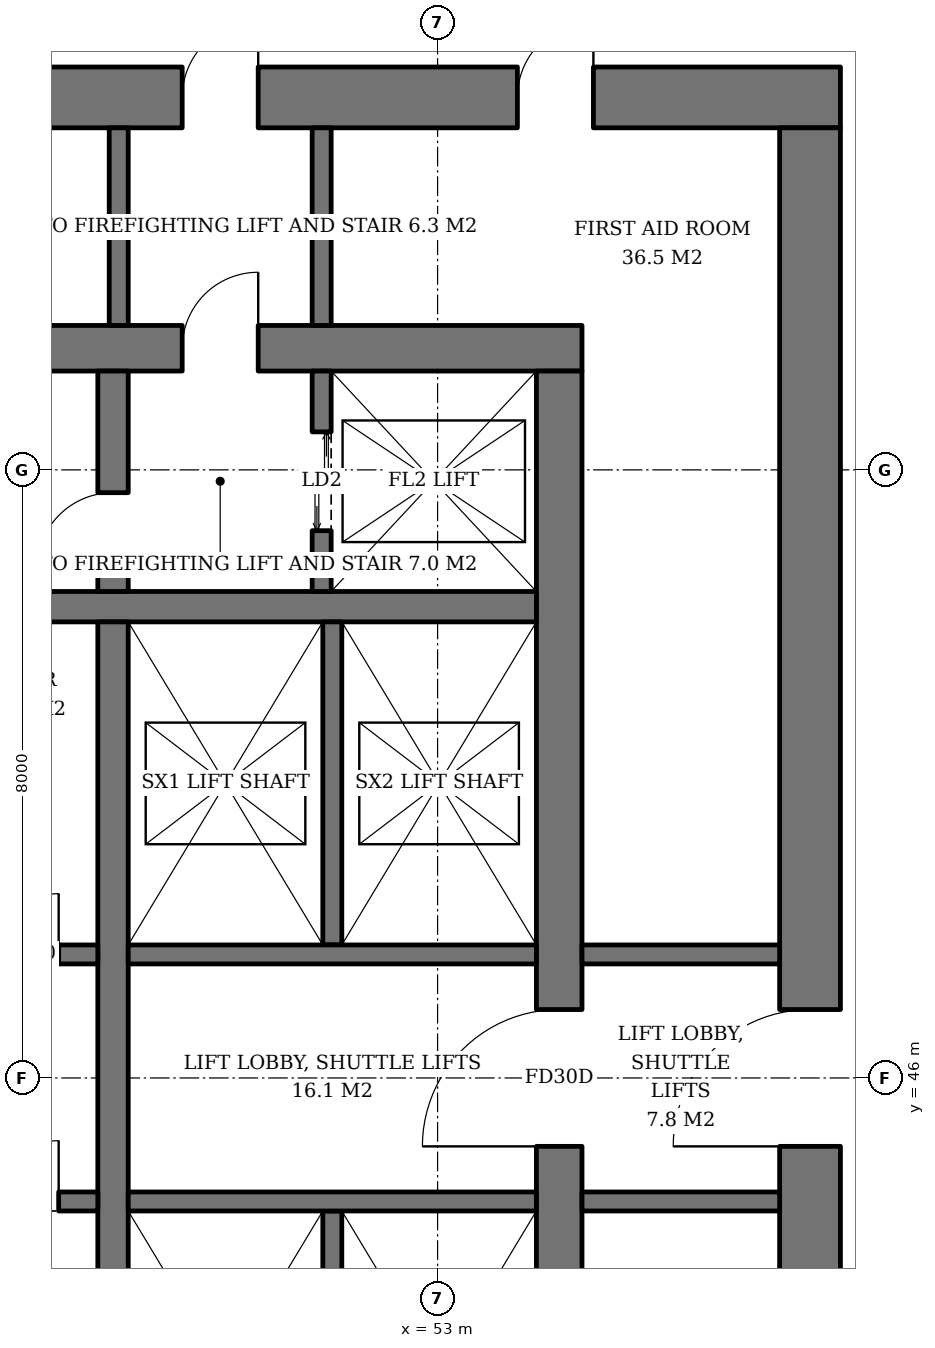
"""IFC4 building model, lengths in metres.
Left out: names, types, materials, properties, quantities, classifications, styles, units other than length and angle.
Written with IfcOpenShell. Run it as: python <this file> out.ifc"""

import sys

from ifc_helpers import new_model, si_unit, direction, frame, frame_2d, origin, place, context, subcontext, project, spatial, rectangle, extrude, element, fill, save


model = new_model("IFC4")
c1 = context("Model", 3, precision=1e-05, world=origin(), true_north=direction((0.0, 1.0)))
c2 = subcontext(c1, "Body", "Model", "MODEL_VIEW")
j1 = project(units=[si_unit("LENGTHUNIT", "METRE"), si_unit("PLANEANGLEUNIT", "RADIAN")], contexts=[c1])
p1 = place(None, origin())
s1 = spatial("IfcSite", under=j1, at=p1, CompositionType="ELEMENT")
p2 = place(p1, origin())
s2 = spatial("IfcBuilding", under=s1, at=p2, CompositionType="ELEMENT")
p3 = place(p2, frame((0.0, 0.0, 55.2)))
s3 = spatial("IfcBuildingStorey", under=s2, at=p3, CompositionType="ELEMENT", Elevation=55.2)
p4 = place(p3, frame((35.1, 55.6, 0.0), z_axis=(0.0, 0.0, 1.0), x_axis=(1.0, 0.0, 0.0)))
e1 = element("IfcWall", 1, at=p4, inside=s3, PredefinedType="SHEAR", context=c2, shape_type="SweptSolid", body=[
    extrude(rectangle(XDim=19.8, YDim=0.6, at=frame_2d((9.9, 0.0))), origin(), (0.0, 0.0, 1.0), 3.8),
])
p5 = place(p4, frame((14.54, 0.0, 0.0)))
e2 = element("IfcOpeningElement", 2, at=p5, cuts=e1, PredefinedType="OPENING", context=c2, shape_type="SweptSolid", body=[
    extrude(rectangle(XDim=1.0, YDim=2.1, at=frame_2d((0.5, 1.05))), frame((0.0, 0.31, 0.0), z_axis=(0.0, -1.0, 0.0), x_axis=(1.0, 0.0, 0.0)), (0.0, 0.0, 1.0), 0.62),
])
p6 = place(p4, frame((2.425, 0.0, 0.0)))
e3 = element("IfcOpeningElement", 3, at=p6, cuts=e1, PredefinedType="OPENING", context=c2, shape_type="SweptSolid", body=[
    extrude(rectangle(XDim=1.0, YDim=2.1, at=frame_2d((0.5, 1.05))), frame((0.0, 0.31, 0.0), z_axis=(0.0, -1.0, 0.0), x_axis=(1.0, 0.0, 0.0)), (0.0, 0.0, 1.0), 0.62),
])
p7 = place(p3, frame((54.6, 36.7, 0.0), z_axis=(0.0, 0.0, 1.0), x_axis=(0.0, 1.0, 0.0)))
e4 = element("IfcWall", 4, at=p7, inside=s3, PredefinedType="SHEAR", context=c2, shape_type="SweptSolid", body=[
    extrude(rectangle(XDim=18.6, YDim=0.6, at=frame_2d((9.3, 0.0))), origin(), (0.0, 0.0, 1.0), 3.8),
])
p8 = place(p7, frame((8.4, 0.0, 0.0)))
e5 = element("IfcOpeningElement", 5, at=p8, cuts=e4, PredefinedType="OPENING", context=c2, shape_type="SweptSolid", body=[
    extrude(rectangle(XDim=1.8, YDim=2.4, at=frame_2d((0.9, 1.2))), frame((0.0, 0.31, 0.0), z_axis=(0.0, -1.0, 0.0), x_axis=(1.0, 0.0, 0.0)), (0.0, 0.0, 1.0), 0.62),
])
p9 = place(p3, frame((31.7, 58.9, 0.0), z_axis=(0.0, 0.0, 1.0), x_axis=(1.0, 0.0, 0.0)))
e6 = element("IfcWall", 6, at=p9, inside=s3, PredefinedType="SHEAR", context=c2, shape_type="SweptSolid", body=[
    extrude(rectangle(XDim=26.6, YDim=0.8, at=frame_2d((13.3, 0.0))), origin(), (0.0, 0.0, 1.0), 3.8),
])
p10 = place(p9, frame((17.94, 0.0, 0.0)))
e7 = element("IfcOpeningElement", 7, at=p10, cuts=e6, PredefinedType="OPENING", context=c2, shape_type="SweptSolid", body=[
    extrude(rectangle(XDim=1.0, YDim=2.1, at=frame_2d((0.5, 1.05))), frame((0.0, 0.41, 0.0), z_axis=(0.0, -1.0, 0.0), x_axis=(1.0, 0.0, 0.0)), (0.0, 0.0, 1.0), 0.82),
])
p11 = place(p9, frame((5.825, 0.0, 0.0)))
e8 = element("IfcOpeningElement", 8, at=p11, cuts=e6, PredefinedType="OPENING", context=c2, shape_type="SweptSolid", body=[
    extrude(rectangle(XDim=1.0, YDim=2.1, at=frame_2d((0.5, 1.05))), frame((0.0, 0.41, 0.0), z_axis=(0.0, -1.0, 0.0), x_axis=(1.0, 0.0, 0.0)), (0.0, 0.0, 1.0), 0.82),
])
p12 = place(p9, frame((1.05, 0.0, 0.0)))
e9 = element("IfcOpeningElement", 9, at=p12, cuts=e6, PredefinedType="OPENING", context=c2, shape_type="SweptSolid", body=[
    extrude(rectangle(XDim=1.0, YDim=2.1, at=frame_2d((0.5, 1.05))), frame((0.0, 0.41, 0.0), z_axis=(0.0, -1.0, 0.0), x_axis=(1.0, 0.0, 0.0)), (0.0, 0.0, 1.0), 0.82),
])
p13 = place(p9, frame((2.546, 0.0, 0.0)))
e10 = element("IfcOpeningElement", 10, at=p13, cuts=e6, PredefinedType="OPENING", context=c2, shape_type="SweptSolid", body=[
    extrude(rectangle(XDim=1.0, YDim=2.1, at=frame_2d((0.5, 1.05))), frame((0.0, 0.41, 0.0), z_axis=(0.0, -1.0, 0.0), x_axis=(1.0, 0.0, 0.0)), (0.0, 0.0, 1.0), 0.82),
])
p14 = place(p9, frame((4.134, 0.0, 0.0)))
e11 = element("IfcOpeningElement", 11, at=p14, cuts=e6, PredefinedType="OPENING", context=c2, shape_type="SweptSolid", body=[
    extrude(rectangle(XDim=1.0, YDim=2.1, at=frame_2d((0.5, 1.05))), frame((0.0, 0.41, 0.0), z_axis=(0.0, -1.0, 0.0), x_axis=(1.0, 0.0, 0.0)), (0.0, 0.0, 1.0), 0.82),
])
p15 = place(p9, frame((9.126, 0.0, 0.0)))
e12 = element("IfcOpeningElement", 12, at=p15, cuts=e6, PredefinedType="OPENING", context=c2, shape_type="SweptSolid", body=[
    extrude(rectangle(XDim=1.0, YDim=2.1, at=frame_2d((0.5, 1.05))), frame((0.0, 0.41, 0.0), z_axis=(0.0, -1.0, 0.0), x_axis=(1.0, 0.0, 0.0)), (0.0, 0.0, 1.0), 0.82),
])
p16 = place(p9, frame((14.029, 0.0, 0.0)))
e13 = element("IfcOpeningElement", 13, at=p16, cuts=e6, PredefinedType="OPENING", context=c2, shape_type="SweptSolid", body=[
    extrude(rectangle(XDim=1.0, YDim=2.1, at=frame_2d((0.5, 1.05))), frame((0.0, 0.41, 0.0), z_axis=(0.0, -1.0, 0.0), x_axis=(1.0, 0.0, 0.0)), (0.0, 0.0, 1.0), 0.82),
])
p17 = place(p9, frame((22.35, 0.0, 0.0)))
e14 = element("IfcOpeningElement", 14, at=p17, cuts=e6, PredefinedType="OPENING", context=c2, shape_type="SweptSolid", body=[
    extrude(rectangle(XDim=1.0, YDim=2.1, at=frame_2d((0.5, 1.05))), frame((0.0, 0.41, 0.0), z_axis=(0.0, -1.0, 0.0), x_axis=(1.0, 0.0, 0.0)), (0.0, 0.0, 1.0), 0.82),
])
p18 = place(p3, frame((57.9, 33.5, 0.0), z_axis=(0.0, 0.0, 1.0), x_axis=(0.0, 1.0, 0.0)))
e15 = element("IfcWall", 15, at=p18, inside=s3, PredefinedType="SHEAR", context=c2, shape_type="SweptSolid", body=[
    extrude(rectangle(XDim=25.0, YDim=0.8, at=frame_2d((12.5, 0.0))), origin(), (0.0, 0.0, 1.0), 3.8),
])
p19 = place(p18, frame((11.6, 0.0, 0.0)))
e16 = element("IfcOpeningElement", 16, at=p19, cuts=e15, PredefinedType="OPENING", context=c2, shape_type="SweptSolid", body=[
    extrude(rectangle(XDim=1.8, YDim=2.4, at=frame_2d((0.9, 1.2))), frame((0.0, 0.41, 0.0), z_axis=(0.0, -1.0, 0.0), x_axis=(1.0, 0.0, 0.0)), (0.0, 0.0, 1.0), 0.82),
])
p20 = place(p3, frame((35.7, 52.2, 0.0), z_axis=(0.0, 0.0, 1.0), x_axis=(1.0, 0.0, 0.0)))
e17 = element("IfcWall", 17, at=p20, inside=s3, PredefinedType="SHEAR", context=c2, shape_type="SweptSolid", body=[
    extrude(rectangle(XDim=18.6, YDim=0.4, at=frame_2d((9.3, 0.0))), origin(), (0.0, 0.0, 1.0), 3.8),
])
p21 = place(p3, frame((48.73, 40.0, 0.0), z_axis=(0.0, 0.0, 1.0), x_axis=(0.0, 1.0, 0.0)))
e18 = element("IfcWall", 18, at=p21, inside=s3, PredefinedType="SHEAR", context=c2, shape_type="SweptSolid", body=[
    extrude(rectangle(XDim=12.0, YDim=0.4, at=frame_2d((6.0, 0.0))), origin(), (0.0, 0.0, 1.0), 3.8),
])
p22 = place(p3, frame((48.73, 52.4, 0.0), z_axis=(0.0, 0.0, 1.0), x_axis=(0.0, 1.0, 0.0)))
e19 = element("IfcWall", 19, at=p22, inside=s3, PredefinedType="SHEAR", context=c2, shape_type="SweptSolid", body=[
    extrude(rectangle(XDim=2.9, YDim=0.4, at=frame_2d((1.45, 0.0))), origin(), (0.0, 0.0, 1.0), 3.8),
])
p23 = place(p22, frame((0.3, 0.0, 0.0)))
e20 = element("IfcOpeningElement", 20, at=p23, cuts=e19, PredefinedType="OPENING", context=c2, shape_type="SweptSolid", body=[
    extrude(rectangle(XDim=1.0, YDim=2.1, at=frame_2d((0.5, 1.05))), frame((0.0, 0.21, 0.0), z_axis=(0.0, -1.0, 0.0), x_axis=(1.0, 0.0, 0.0)), (0.0, 0.0, 1.0), 0.42),
])
p24 = place(p3, frame((51.475, 52.4, 0.0), z_axis=(0.0, 0.0, 1.0), x_axis=(0.0, 1.0, 0.0)))
e21 = element("IfcWall", 21, at=p24, inside=s3, PredefinedType="SHEAR", context=c2, shape_type="SweptSolid", body=[
    extrude(rectangle(XDim=2.9, YDim=0.25, at=frame_2d((1.45, 0.0))), origin(), (0.0, 0.0, 1.0), 3.8),
])
p25 = place(p24, frame((0.8, 0.0, 0.0)))
e22 = element("IfcOpeningElement", 22, at=p25, cuts=e21, PredefinedType="OPENING", context=c2, shape_type="SweptSolid", body=[
    extrude(rectangle(XDim=1.3, YDim=2.2, at=frame_2d((0.65, 1.1))), frame((0.0, 0.135, 0.0), z_axis=(0.0, -1.0, 0.0), x_axis=(1.0, 0.0, 0.0)), (0.0, 0.0, 1.0), 0.27),
])
p26 = place(p3, frame((35.7, 47.625, 0.0), z_axis=(0.0, 0.0, 1.0), x_axis=(1.0, 0.0, 0.0)))
e23 = element("IfcWall", 23, at=p26, inside=s3, PredefinedType="SHEAR", context=c2, shape_type="SweptSolid", body=[
    extrude(rectangle(XDim=12.83, YDim=0.25, at=frame_2d((6.415, 0.0))), origin(), (0.0, 0.0, 1.0), 3.8),
])
p27 = place(p26, frame((0.7, 0.0, 0.0)))
e24 = element("IfcOpeningElement", 24, at=p27, cuts=e23, PredefinedType="OPENING", context=c2, shape_type="SweptSolid", body=[
    extrude(rectangle(XDim=1.1, YDim=2.2, at=frame_2d((0.55, 1.1))), frame((0.0, 0.135, 0.0), z_axis=(0.0, -1.0, 0.0), x_axis=(1.0, 0.0, 0.0)), (0.0, 0.0, 1.0), 0.27),
])
p28 = place(p26, frame((3.45, 0.0, 0.0)))
e25 = element("IfcOpeningElement", 25, at=p28, cuts=e23, PredefinedType="OPENING", context=c2, shape_type="SweptSolid", body=[
    extrude(rectangle(XDim=1.1, YDim=2.2, at=frame_2d((0.55, 1.1))), frame((0.0, 0.135, 0.0), z_axis=(0.0, -1.0, 0.0), x_axis=(1.0, 0.0, 0.0)), (0.0, 0.0, 1.0), 0.27),
])
p29 = place(p26, frame((6.2, 0.0, 0.0)))
e26 = element("IfcOpeningElement", 26, at=p29, cuts=e23, PredefinedType="OPENING", context=c2, shape_type="SweptSolid", body=[
    extrude(rectangle(XDim=1.1, YDim=2.2, at=frame_2d((0.55, 1.1))), frame((0.0, 0.135, 0.0), z_axis=(0.0, -1.0, 0.0), x_axis=(1.0, 0.0, 0.0)), (0.0, 0.0, 1.0), 0.27),
])
p30 = place(p26, frame((8.95, 0.0, 0.0)))
e27 = element("IfcOpeningElement", 27, at=p30, cuts=e23, PredefinedType="OPENING", context=c2, shape_type="SweptSolid", body=[
    extrude(rectangle(XDim=1.1, YDim=2.2, at=frame_2d((0.55, 1.1))), frame((0.0, 0.135, 0.0), z_axis=(0.0, -1.0, 0.0), x_axis=(1.0, 0.0, 0.0)), (0.0, 0.0, 1.0), 0.27),
])
p31 = place(p26, frame((11.515, 0.0, 0.0)))
e28 = element("IfcOpeningElement", 28, at=p31, cuts=e23, PredefinedType="OPENING", context=c2, shape_type="SweptSolid", body=[
    extrude(rectangle(XDim=0.8, YDim=2.0, at=frame_2d((0.4, 1.0))), frame((0.0, 0.135, 0.0), z_axis=(0.0, -1.0, 0.0), x_axis=(1.0, 0.0, 0.0)), (0.0, 0.0, 1.0), 0.27),
])
p32 = place(p3, frame((35.7, 44.375, 0.0), z_axis=(0.0, 0.0, 1.0), x_axis=(1.0, 0.0, 0.0)))
e29 = element("IfcWall", 29, at=p32, inside=s3, PredefinedType="SHEAR", context=c2, shape_type="SweptSolid", body=[
    extrude(rectangle(XDim=12.83, YDim=0.25, at=frame_2d((6.415, 0.0))), origin(), (0.0, 0.0, 1.0), 3.8),
])
p33 = place(p32, frame((0.7, 0.0, 0.0)))
e30 = element("IfcOpeningElement", 30, at=p33, cuts=e29, PredefinedType="OPENING", context=c2, shape_type="SweptSolid", body=[
    extrude(rectangle(XDim=1.1, YDim=2.2, at=frame_2d((0.55, 1.1))), frame((0.0, 0.135, 0.0), z_axis=(0.0, -1.0, 0.0), x_axis=(1.0, 0.0, 0.0)), (0.0, 0.0, 1.0), 0.27),
])
p34 = place(p32, frame((3.45, 0.0, 0.0)))
e31 = element("IfcOpeningElement", 31, at=p34, cuts=e29, PredefinedType="OPENING", context=c2, shape_type="SweptSolid", body=[
    extrude(rectangle(XDim=1.1, YDim=2.2, at=frame_2d((0.55, 1.1))), frame((0.0, 0.135, 0.0), z_axis=(0.0, -1.0, 0.0), x_axis=(1.0, 0.0, 0.0)), (0.0, 0.0, 1.0), 0.27),
])
p35 = place(p32, frame((6.2, 0.0, 0.0)))
e32 = element("IfcOpeningElement", 32, at=p35, cuts=e29, PredefinedType="OPENING", context=c2, shape_type="SweptSolid", body=[
    extrude(rectangle(XDim=1.1, YDim=2.2, at=frame_2d((0.55, 1.1))), frame((0.0, 0.135, 0.0), z_axis=(0.0, -1.0, 0.0), x_axis=(1.0, 0.0, 0.0)), (0.0, 0.0, 1.0), 0.27),
])
p36 = place(p32, frame((8.95, 0.0, 0.0)))
e33 = element("IfcOpeningElement", 33, at=p36, cuts=e29, PredefinedType="OPENING", context=c2, shape_type="SweptSolid", body=[
    extrude(rectangle(XDim=1.1, YDim=2.2, at=frame_2d((0.55, 1.1))), frame((0.0, 0.135, 0.0), z_axis=(0.0, -1.0, 0.0), x_axis=(1.0, 0.0, 0.0)), (0.0, 0.0, 1.0), 0.27),
])
p37 = place(p32, frame((11.515, 0.0, 0.0)))
e34 = element("IfcOpeningElement", 34, at=p37, cuts=e29, PredefinedType="OPENING", context=c2, shape_type="SweptSolid", body=[
    extrude(rectangle(XDim=0.8, YDim=2.0, at=frame_2d((0.4, 1.0))), frame((0.0, 0.135, 0.0), z_axis=(0.0, -1.0, 0.0), x_axis=(1.0, 0.0, 0.0)), (0.0, 0.0, 1.0), 0.27),
])
p38 = place(p3, frame((51.615, 47.75, 0.0), z_axis=(0.0, 0.0, 1.0), x_axis=(0.0, 1.0, 0.0)))
e35 = element("IfcWall", 35, at=p38, inside=s3, PredefinedType="SHEAR", context=c2, shape_type="SweptSolid", body=[
    extrude(rectangle(XDim=4.25, YDim=0.25, at=frame_2d((2.125, 0.0))), origin(), (0.0, 0.0, 1.0), 3.8),
])
p39 = place(p3, frame((48.93, 47.625, 0.0), z_axis=(0.0, 0.0, 1.0), x_axis=(1.0, 0.0, 0.0)))
e36 = element("IfcWall", 36, at=p39, inside=s3, PredefinedType="SHEAR", context=c2, shape_type="SweptSolid", body=[
    extrude(rectangle(XDim=5.37, YDim=0.25, at=frame_2d((2.685, 0.0))), origin(), (0.0, 0.0, 1.0), 3.8),
])
p40 = place(p3, frame((51.615, 44.25, 0.0), z_axis=(0.0, 0.0, 1.0), x_axis=(0.0, -1.0, 0.0)))
e37 = element("IfcWall", 37, at=p40, inside=s3, PredefinedType="SHEAR", context=c2, shape_type="SweptSolid", body=[
    extrude(rectangle(XDim=4.25, YDim=0.25, at=frame_2d((2.125, 0.0))), origin(), (0.0, 0.0, 1.0), 3.8),
])
p41 = place(p3, frame((48.93, 44.375, 0.0), z_axis=(0.0, 0.0, 1.0), x_axis=(1.0, 0.0, 0.0)))
e38 = element("IfcWall", 38, at=p41, inside=s3, PredefinedType="SHEAR", context=c2, shape_type="SweptSolid", body=[
    extrude(rectangle(XDim=5.37, YDim=0.25, at=frame_2d((2.685, 0.0))), origin(), (0.0, 0.0, 1.0), 3.8),
])
for number, where, z_axis, x_axis in (
    (39, (48.805, 55.9, 0.0), (0.0, 0.0, 1.0), (0.0, 1.0, 0.0)),
    (40, (51.475, 55.9, 0.0), (0.0, 0.0, 1.0), (0.0, 1.0, 0.0)),
    (41, (54.9, 44.375, 0.0), (0.0, 0.0, 1.0), (1.0, 0.0, 0.0)),
    (42, (54.9, 47.625, 0.0), (0.0, 0.0, 1.0), (1.0, 0.0, 0.0)),
):
    element("IfcWall", number, at=place(p3, frame(where, z_axis=z_axis, x_axis=x_axis)), inside=s3, PredefinedType="SOLIDWALL", context=c2, shape_type="SweptSolid", body=[
        extrude(rectangle(XDim=2.6, YDim=0.25, at=frame_2d((1.3, 0.0))), origin(), (0.0, 0.0, 1.0), 3.62),
    ])
p42 = place(p25, origin())
e43 = element("IfcDoor", 43, at=p42, inside=s3, OperationType="DOUBLE_DOOR_SLIDING", PredefinedType="DOOR", context=c2, shape_type="SweptSolid", body=[
    extrude(rectangle(XDim=1.3, YDim=2.2, at=frame_2d((0.65, 1.1))), frame((0.0, 0.025, 0.0), z_axis=(0.0, -1.0, 0.0), x_axis=(1.0, 0.0, 0.0)), (0.0, 0.0, 1.0), 0.05),
])
fill(e22, e43)
p43 = place(p31, origin())
e44 = element("IfcDoor", 44, at=p43, inside=s3, OperationType="SINGLE_SWING_RIGHT", PredefinedType="DOOR", context=c2, shape_type="SweptSolid", body=[
    extrude(rectangle(XDim=0.8, YDim=2.0, at=frame_2d((0.4, 1.0))), frame((0.0, 0.025, 0.0), z_axis=(0.0, -1.0, 0.0), x_axis=(1.0, 0.0, 0.0)), (0.0, 0.0, 1.0), 0.05),
])
fill(e28, e44)
p44 = place(p37, origin())
e45 = element("IfcDoor", 45, at=p44, inside=s3, OperationType="SINGLE_SWING_RIGHT", PredefinedType="DOOR", context=c2, shape_type="SweptSolid", body=[
    extrude(rectangle(XDim=0.8, YDim=2.0, at=frame_2d((0.4, 1.0))), frame((0.0, 0.025, 0.0), z_axis=(0.0, -1.0, 0.0), x_axis=(1.0, 0.0, 0.0)), (0.0, 0.0, 1.0), 0.05),
])
fill(e34, e45)
p45 = place(p23, origin())
e46 = element("IfcDoor", 46, at=p45, inside=s3, OperationType="SINGLE_SWING_LEFT", PredefinedType="DOOR", context=c2, shape_type="SweptSolid", body=[
    extrude(rectangle(XDim=1.0, YDim=2.1, at=frame_2d((0.5, 1.05))), frame((0.0, 0.025, 0.0), z_axis=(0.0, -1.0, 0.0), x_axis=(1.0, 0.0, 0.0)), (0.0, 0.0, 1.0), 0.05),
])
fill(e20, e46)
p46 = place(p5, origin())
e47 = element("IfcDoor", 47, at=p46, inside=s3, OperationType="SINGLE_SWING_RIGHT", PredefinedType="DOOR", context=c2, shape_type="SweptSolid", body=[
    extrude(rectangle(XDim=1.0, YDim=2.1, at=frame_2d((0.5, 1.05))), frame((0.0, 0.025, 0.0), z_axis=(0.0, -1.0, 0.0), x_axis=(1.0, 0.0, 0.0)), (0.0, 0.0, 1.0), 0.05),
])
fill(e2, e47)
p47 = place(p8, origin())
e48 = element("IfcDoor", 48, at=p47, inside=s3, OperationType="DOUBLE_DOOR_SINGLE_SWING", PredefinedType="DOOR", context=c2, shape_type="SweptSolid", body=[
    extrude(rectangle(XDim=1.8, YDim=2.4, at=frame_2d((0.9, 1.2))), frame((0.0, 0.025, 0.0), z_axis=(0.0, -1.0, 0.0), x_axis=(1.0, 0.0, 0.0)), (0.0, 0.0, 1.0), 0.05),
])
fill(e5, e48)
p48 = place(p19, origin())
e49 = element("IfcDoor", 49, at=p48, inside=s3, OperationType="DOUBLE_DOOR_SINGLE_SWING", PredefinedType="DOOR", context=c2, shape_type="SweptSolid", body=[
    extrude(rectangle(XDim=1.8, YDim=2.4, at=frame_2d((0.9, 1.2))), frame((0.0, 0.025, 0.0), z_axis=(0.0, -1.0, 0.0), x_axis=(1.0, 0.0, 0.0)), (0.0, 0.0, 1.0), 0.05),
])
fill(e16, e49)
p49 = place(p10, origin())
e50 = element("IfcDoor", 50, at=p49, inside=s3, OperationType="SINGLE_SWING_RIGHT", PredefinedType="DOOR", context=c2, shape_type="SweptSolid", body=[
    extrude(rectangle(XDim=1.0, YDim=2.1, at=frame_2d((0.5, 1.05))), frame((0.0, 0.025, 0.0), z_axis=(0.0, -1.0, 0.0), x_axis=(1.0, 0.0, 0.0)), (0.0, 0.0, 1.0), 0.05),
])
fill(e7, e50)
p50 = place(p17, origin())
e51 = element("IfcDoor", 51, at=p50, inside=s3, OperationType="SINGLE_SWING_RIGHT", PredefinedType="DOOR", context=c2, shape_type="SweptSolid", body=[
    extrude(rectangle(XDim=1.0, YDim=2.1, at=frame_2d((0.5, 1.05))), frame((0.0, -0.34, 0.0), z_axis=(0.0, -1.0, 0.0), x_axis=(1.0, 0.0, 0.0)), (0.0, 0.0, 1.0), 0.05),
])
fill(e14, e51)
save(model, sys.argv[1])
